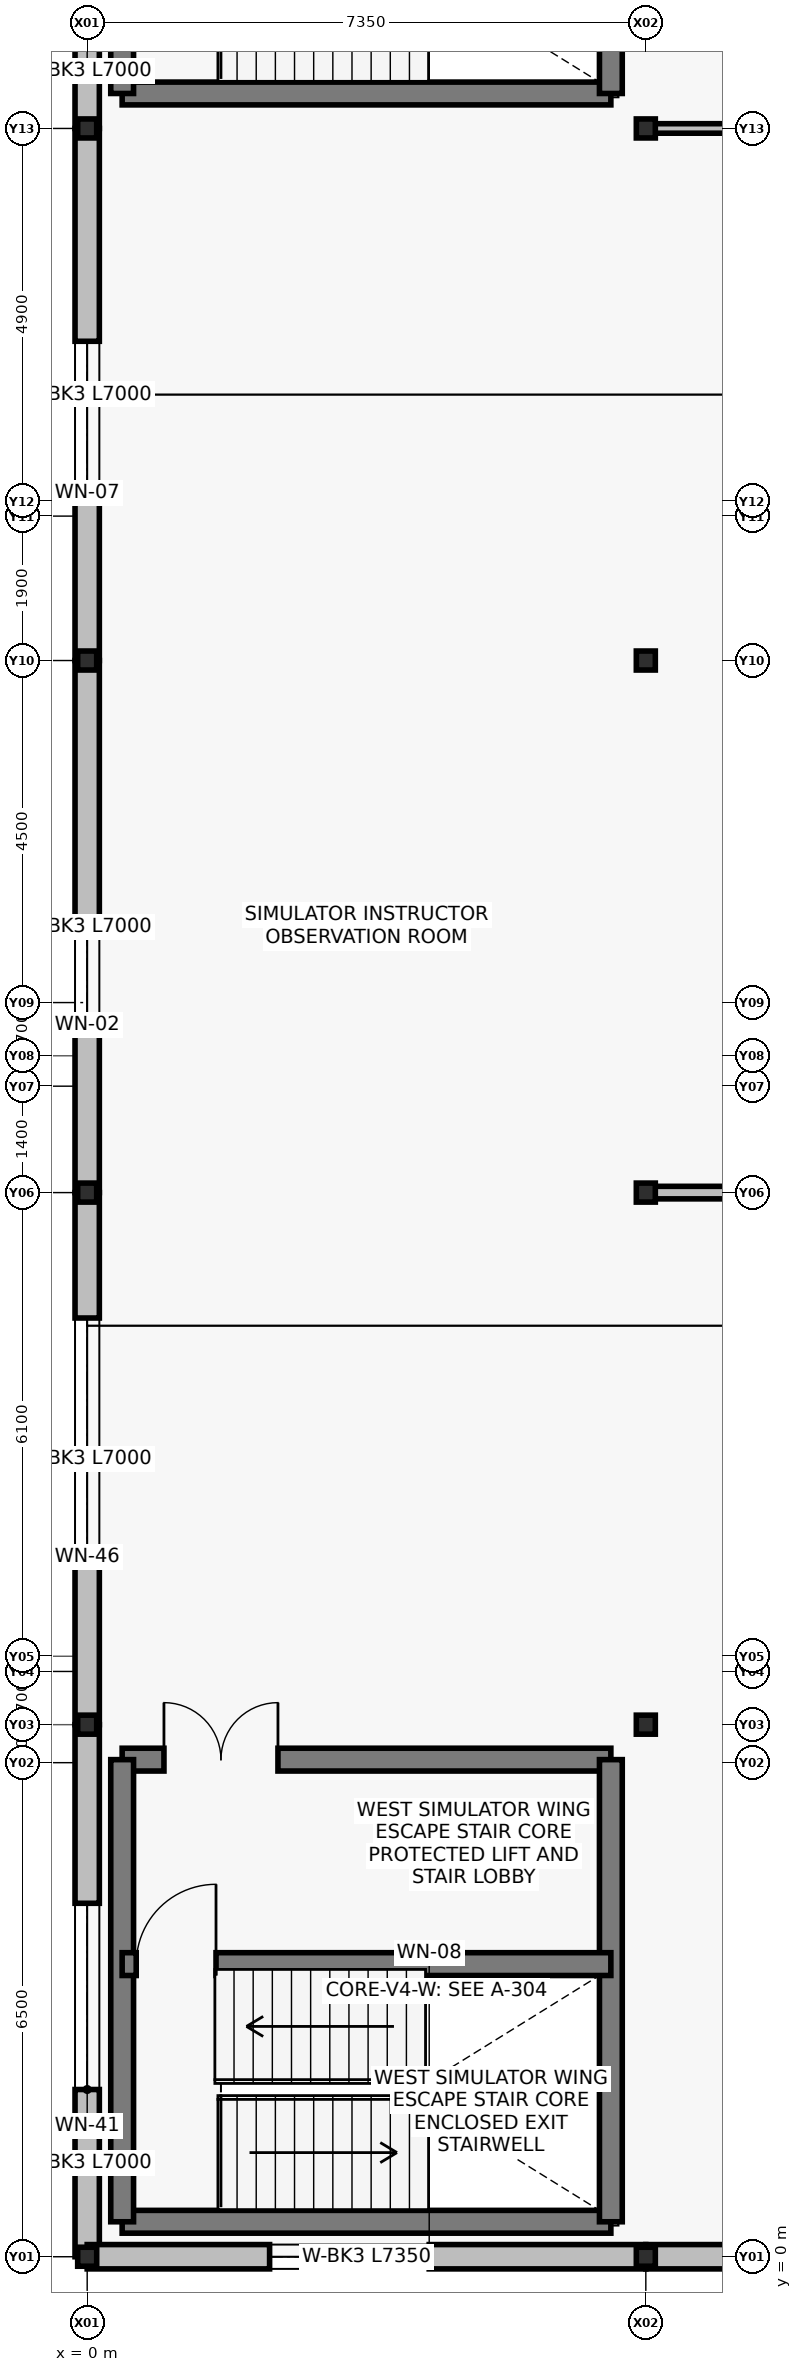
"""IFC4 building model, lengths in metres.
Left out: names, types, materials, properties, quantities, classifications, styles, units other than length and angle.
Written with IfcOpenShell. Run it as: python <this file> out.ifc"""

import sys

from ifc_helpers import new_model, si_unit, direction, frame, frame_2d, origin, origin_with_axes, origin_2d, place, context, subcontext, project, spatial, rectangle, i_section, extrude, element, fill, save


model = new_model("IFC4")
c1 = context("Model", 3, precision=1e-05, world=origin(), true_north=direction((0.0, 1.0)))
c2 = subcontext(c1, "Body", "Model", "MODEL_VIEW")
j1 = project(units=[si_unit("LENGTHUNIT", "METRE"), si_unit("PLANEANGLEUNIT", "RADIAN")], contexts=[c1])
p1 = place(None, origin())
s1 = spatial("IfcSite", under=j1, at=p1, CompositionType="ELEMENT")
p2 = place(p1, origin())
s2 = spatial("IfcBuilding", under=s1, at=p2, CompositionType="ELEMENT")
p3 = place(p2, frame((0.0, 0.0, 15.3)))
s3 = spatial("IfcBuildingStorey", under=s2, at=p3, CompositionType="ELEMENT", Elevation=15.3)
for number, where, z_axis, x_axis in (
    (1, (0.0, 0.0, 0.0), (0.0, 0.0, 1.0), (1.0, 0.0, 0.0)),
    (2, (0.0, 7.0, 0.0), (0.0, 0.0, 1.0), (1.0, 0.0, 0.0)),
    (3, (0.0, 14.0, 0.0), (0.0, 0.0, 1.0), (1.0, 0.0, 0.0)),
    (4, (0.0, 21.0, 0.0), (0.0, 0.0, 1.0), (1.0, 0.0, 0.0)),
    (5, (0.0, 28.0, 0.0), (0.0, 0.0, 1.0), (1.0, 0.0, 0.0)),
    (6, (7.35, 0.0, 0.0), (0.0, 0.0, 1.0), (1.0, 0.0, 0.0)),
    (7, (7.35, 7.0, 0.0), (0.0, 0.0, 1.0), (1.0, 0.0, 0.0)),
    (8, (7.35, 14.0, 0.0), (0.0, 0.0, 1.0), (1.0, 0.0, 0.0)),
    (9, (7.35, 21.0, 0.0), (0.0, 0.0, 1.0), (1.0, 0.0, 0.0)),
    (10, (7.35, 28.0, 0.0), (0.0, 0.0, 1.0), (1.0, 0.0, 0.0)),
):
    element("IfcColumn", number, at=place(p3, frame(where, z_axis=z_axis, x_axis=x_axis)), inside=s3, PredefinedType="COLUMN", context=c2, shape_type="SweptSolid", body=[
        extrude(i_section(OverallWidth=0.25, OverallDepth=0.25, WebThickness=0.009, FlangeThickness=0.014, at=origin_2d()), origin(), (0.0, 0.0, 1.0), 4.2),
    ])
p4 = place(p3, frame((0.0, 0.0, 0.0), z_axis=(0.0, 0.0, 1.0), x_axis=(0.0, 1.0, 0.0)))
e11 = element("IfcWall", 11, at=p4, inside=s3, PredefinedType="SOLIDWALL", context=c2, shape_type="SweptSolid", body=[
    extrude(rectangle(XDim=7.0, YDim=0.32, at=frame_2d((3.5, 0.0))), origin(), (0.0, 0.0, 1.0), 3.45),
])
p5 = place(p4, frame((2.2, 0.0, 0.9)))
e12 = element("IfcOpeningElement", 12, at=p5, cuts=e11, PredefinedType="OPENING", context=c2, shape_type="SweptSolid", body=[
    extrude(rectangle(XDim=2.45, YDim=2.05, at=frame_2d((1.225, 1.025))), frame((0.0, 0.17, 0.0), z_axis=(0.0, -1.0, 0.0), x_axis=(1.0, 0.0, 0.0)), (0.0, 0.0, 1.0), 0.34),
])
p6 = place(p3, frame((0.0, 7.0, 0.0), z_axis=(0.0, 0.0, 1.0), x_axis=(0.0, 1.0, 0.0)))
e13 = element("IfcWall", 13, at=p6, inside=s3, PredefinedType="SOLIDWALL", context=c2, shape_type="SweptSolid", body=[
    extrude(rectangle(XDim=7.0, YDim=0.32, at=frame_2d((3.5, 0.0))), origin(), (0.0, 0.0, 1.0), 3.45),
])
p7 = place(p6, frame((2.2, 0.0, 0.9)))
e14 = element("IfcOpeningElement", 14, at=p7, cuts=e13, PredefinedType="OPENING", context=c2, shape_type="SweptSolid", body=[
    extrude(rectangle(XDim=3.15, YDim=1.95, at=frame_2d((1.575, 0.975))), frame((0.0, 0.17, 0.0), z_axis=(0.0, -1.0, 0.0), x_axis=(1.0, 0.0, 0.0)), (0.0, 0.0, 1.0), 0.34),
])
p8 = place(p3, frame((0.0, 14.0, 0.0), z_axis=(0.0, 0.0, 1.0), x_axis=(0.0, 1.0, 0.0)))
e15 = element("IfcWall", 15, at=p8, inside=s3, PredefinedType="SOLIDWALL", context=c2, shape_type="SweptSolid", body=[
    extrude(rectangle(XDim=7.0, YDim=0.32, at=frame_2d((3.5, 0.0))), origin(), (0.0, 0.0, 1.0), 3.45),
])
p9 = place(p8, frame((2.2, 0.0, 0.9)))
e16 = element("IfcOpeningElement", 16, at=p9, cuts=e15, PredefinedType="OPENING", context=c2, shape_type="SweptSolid", body=[
    extrude(rectangle(XDim=1.4, YDim=1.6, at=frame_2d((0.7, 0.8))), frame((0.0, 0.17, 0.0), z_axis=(0.0, -1.0, 0.0), x_axis=(1.0, 0.0, 0.0)), (0.0, 0.0, 1.0), 0.34),
])
p10 = place(p3, frame((0.0, 21.0, 0.0), z_axis=(0.0, 0.0, 1.0), x_axis=(0.0, 1.0, 0.0)))
e17 = element("IfcWall", 17, at=p10, inside=s3, PredefinedType="SOLIDWALL", context=c2, shape_type="SweptSolid", body=[
    extrude(rectangle(XDim=7.0, YDim=0.32, at=frame_2d((3.5, 0.0))), origin(), (0.0, 0.0, 1.0), 3.45),
])
p11 = place(p10, frame((2.2, 0.0, 0.9)))
e18 = element("IfcOpeningElement", 18, at=p11, cuts=e17, PredefinedType="OPENING", context=c2, shape_type="SweptSolid", body=[
    extrude(rectangle(XDim=2.0, YDim=1.8, at=frame_2d((1.0, 0.9))), frame((0.0, 0.17, 0.0), z_axis=(0.0, -1.0, 0.0), x_axis=(1.0, 0.0, 0.0)), (0.0, 0.0, 1.0), 0.34),
])
p12 = place(p3, frame((0.0, 28.0, 0.0), z_axis=(0.0, 0.0, 1.0), x_axis=(0.0, 1.0, 0.0)))
e19 = element("IfcWall", 19, at=p12, inside=s3, PredefinedType="SOLIDWALL", context=c2, shape_type="SweptSolid", body=[
    extrude(rectangle(XDim=7.0, YDim=0.32, at=frame_2d((3.5, 0.0))), origin(), (0.0, 0.0, 1.0), 3.45),
])
p13 = place(p12, frame((2.2, 0.0, 0.9)))
e20 = element("IfcOpeningElement", 20, at=p13, cuts=e19, PredefinedType="OPENING", context=c2, shape_type="SweptSolid", body=[
    extrude(rectangle(XDim=2.8, YDim=2.1, at=frame_2d((1.4, 1.05))), frame((0.0, 0.17, 0.0), z_axis=(0.0, -1.0, 0.0), x_axis=(1.0, 0.0, 0.0)), (0.0, 0.0, 1.0), 0.34),
])
p14 = place(p3, origin_with_axes())
e21 = element("IfcWall", 21, at=p14, inside=s3, PredefinedType="SOLIDWALL", context=c2, shape_type="SweptSolid", body=[
    extrude(rectangle(XDim=7.35, YDim=0.32, at=frame_2d((3.675, 0.0))), origin(), (0.0, 0.0, 1.0), 3.45),
])
p15 = place(p14, frame((2.4, 0.0, 0.9)))
e22 = element("IfcOpeningElement", 22, at=p15, cuts=e21, PredefinedType="OPENING", context=c2, shape_type="SweptSolid", body=[
    extrude(rectangle(XDim=2.1, YDim=2.1, at=frame_2d((1.05, 1.05))), frame((0.0, 0.17, 0.0), z_axis=(0.0, -1.0, 0.0), x_axis=(1.0, 0.0, 0.0)), (0.0, 0.0, 1.0), 0.34),
])
p16 = place(p3, frame((7.35, 0.0, 0.0), z_axis=(0.0, 0.0, 1.0), x_axis=(1.0, 0.0, 0.0)))
e23 = element("IfcWall", 23, at=p16, inside=s3, PredefinedType="SOLIDWALL", context=c2, shape_type="SweptSolid", body=[
    extrude(rectangle(XDim=7.35, YDim=0.32, at=frame_2d((3.675, 0.0))), origin(), (0.0, 0.0, 1.0), 3.45),
])
p17 = place(p16, frame((2.4, 0.0, 0.9)))
e24 = element("IfcOpeningElement", 24, at=p17, cuts=e23, PredefinedType="OPENING", context=c2, shape_type="SweptSolid", body=[
    extrude(rectangle(XDim=2.4, YDim=1.8, at=frame_2d((1.2, 0.9))), frame((0.0, 0.17, 0.0), z_axis=(0.0, -1.0, 0.0), x_axis=(1.0, 0.0, 0.0)), (0.0, 0.0, 1.0), 0.34),
])
p18 = place(p3, frame((0.46, 28.46, 0.0), z_axis=(0.0, 0.0, 1.0), x_axis=(1.0, 0.0, 0.0)))
e25 = element("IfcWall", 25, at=p18, inside=s3, PredefinedType="SHEAR", context=c2, shape_type="SweptSolid", body=[
    extrude(rectangle(XDim=6.43, YDim=0.3, at=frame_2d((3.215, 0.0))), origin(), (0.0, 0.0, 1.0), 3.92),
])
for number, where, z_axis, x_axis in (
    (26, (0.46, 28.46, 0.0), (0.0, 0.0, 1.0), (0.0, 1.0, 0.0)),
    (27, (6.89, 28.46, 0.0), (0.0, 0.0, 1.0), (0.0, 1.0, 0.0)),
):
    element("IfcWall", number, at=place(p3, frame(where, z_axis=z_axis, x_axis=x_axis)), inside=s3, PredefinedType="SHEAR", context=c2, shape_type="SweptSolid", body=[
        extrude(rectangle(XDim=6.08, YDim=0.3, at=frame_2d((3.04, 0.0))), origin(), (0.0, 0.0, 1.0), 3.92),
    ])
p19 = place(p3, frame((0.46, 0.46, 0.0), z_axis=(0.0, 0.0, 1.0), x_axis=(1.0, 0.0, 0.0)))
e28 = element("IfcWall", 28, at=p19, inside=s3, PredefinedType="SHEAR", context=c2, shape_type="SweptSolid", body=[
    extrude(rectangle(XDim=6.43, YDim=0.3, at=frame_2d((3.215, 0.0))), origin(), (0.0, 0.0, 1.0), 3.92),
])
p20 = place(p3, frame((0.46, 6.54, 0.0), z_axis=(0.0, 0.0, 1.0), x_axis=(1.0, 0.0, 0.0)))
e29 = element("IfcWall", 29, at=p20, inside=s3, PredefinedType="SHEAR", context=c2, shape_type="SweptSolid", body=[
    extrude(rectangle(XDim=6.43, YDim=0.3, at=frame_2d((3.215, 0.0))), origin(), (0.0, 0.0, 1.0), 3.92),
])
p21 = place(p20, frame((0.55, 0.0, 0.0)))
e30 = element("IfcOpeningElement", 30, at=p21, cuts=e29, PredefinedType="OPENING", context=c2, shape_type="SweptSolid", body=[
    extrude(rectangle(XDim=1.5, YDim=2.2, at=frame_2d((0.75, 1.1))), frame((0.0, 0.16, 0.0), z_axis=(0.0, -1.0, 0.0), x_axis=(1.0, 0.0, 0.0)), (0.0, 0.0, 1.0), 0.32),
])
for number, where, z_axis, x_axis in (
    (31, (0.46, 0.46, 0.0), (0.0, 0.0, 1.0), (0.0, 1.0, 0.0)),
    (32, (6.89, 0.46, 0.0), (0.0, 0.0, 1.0), (0.0, 1.0, 0.0)),
):
    element("IfcWall", number, at=place(p3, frame(where, z_axis=z_axis, x_axis=x_axis)), inside=s3, PredefinedType="SHEAR", context=c2, shape_type="SweptSolid", body=[
        extrude(rectangle(XDim=6.08, YDim=0.3, at=frame_2d((3.04, 0.0))), origin(), (0.0, 0.0, 1.0), 3.92),
    ])
p22 = place(p3, frame((0.46, 3.85, 0.0), z_axis=(0.0, 0.0, 1.0), x_axis=(1.0, 0.0, 0.0)))
e33 = element("IfcWall", 33, at=p22, inside=s3, PredefinedType="SHEAR", context=c2, shape_type="SweptSolid", body=[
    extrude(rectangle(XDim=6.43, YDim=0.3, at=frame_2d((3.215, 0.0))), origin(), (0.0, 0.0, 1.0), 3.92),
])
p23 = place(p22, frame((0.185, 0.0, 0.0)))
e34 = element("IfcOpeningElement", 34, at=p23, cuts=e33, PredefinedType="OPENING", context=c2, shape_type="SweptSolid", body=[
    extrude(rectangle(XDim=1.05, YDim=2.15, at=frame_2d((0.525, 1.075))), frame((0.0, 0.16, 0.0), z_axis=(0.0, -1.0, 0.0), x_axis=(1.0, 0.0, 0.0)), (0.0, 0.0, 1.0), 0.32),
])
p24 = place(p3, frame((7.35, 14.0, 0.0), z_axis=(0.0, 0.0, 1.0), x_axis=(1.0, 0.0, 0.0)))
e35 = element("IfcWall", 35, at=p24, inside=s3, PredefinedType="PARTITIONING", context=c2, shape_type="SweptSolid", body=[
    extrude(rectangle(XDim=22.05, YDim=0.165, at=frame_2d((11.025, 0.0))), origin(), (0.0, 0.0, 1.0), 3.2),
])
p25 = place(p24, frame((4.0, 0.0, 0.0)))
e36 = element("IfcOpeningElement", 36, at=p25, cuts=e35, PredefinedType="OPENING", context=c2, shape_type="SweptSolid", body=[
    extrude(rectangle(XDim=1.7, YDim=2.25, at=frame_2d((0.85, 1.125))), frame((0.0, 0.092, 0.0), z_axis=(0.0, -1.0, 0.0), x_axis=(1.0, 0.0, 0.0)), (0.0, 0.0, 1.0), 0.185),
])
p26 = place(p3, frame((7.35, 28.0, 0.0), z_axis=(0.0, 0.0, 1.0), x_axis=(1.0, 0.0, 0.0)))
e37 = element("IfcWall", 37, at=p26, inside=s3, PredefinedType="PARTITIONING", context=c2, shape_type="SweptSolid", body=[
    extrude(rectangle(XDim=14.7, YDim=0.125, at=frame_2d((7.35, 0.0))), origin(), (0.0, 0.0, 1.0), 3.2),
])
p27 = place(p26, frame((4.0, 0.0, 0.0)))
e38 = element("IfcOpeningElement", 38, at=p27, cuts=e37, PredefinedType="OPENING", context=c2, shape_type="SweptSolid", body=[
    extrude(rectangle(XDim=1.35, YDim=2.2, at=frame_2d((0.675, 1.1))), frame((0.0, 0.072, 0.0), z_axis=(0.0, -1.0, 0.0), x_axis=(1.0, 0.0, 0.0)), (0.0, 0.0, 1.0), 0.145),
])
p28 = place(p5, origin())
e39 = element("IfcWindow", 39, at=p28, inside=s3, PartitioningType="SINGLE_PANEL", PredefinedType="WINDOW", context=c2, shape_type="SweptSolid", body=[
    extrude(rectangle(XDim=2.45, YDim=2.05, at=frame_2d((1.225, 1.025))), frame((0.0, 0.03, 0.0), z_axis=(0.0, -1.0, 0.0), x_axis=(1.0, 0.0, 0.0)), (0.0, 0.0, 1.0), 0.06),
])
fill(e12, e39)
p29 = place(p7, origin())
e40 = element("IfcWindow", 40, at=p29, inside=s3, PartitioningType="SINGLE_PANEL", PredefinedType="WINDOW", context=c2, shape_type="SweptSolid", body=[
    extrude(rectangle(XDim=3.15, YDim=1.95, at=frame_2d((1.575, 0.975))), frame((0.0, 0.03, 0.0), z_axis=(0.0, -1.0, 0.0), x_axis=(1.0, 0.0, 0.0)), (0.0, 0.0, 1.0), 0.06),
])
fill(e14, e40)
p30 = place(p9, origin())
e41 = element("IfcWindow", 41, at=p30, inside=s3, PartitioningType="SINGLE_PANEL", PredefinedType="WINDOW", context=c2, shape_type="SweptSolid", body=[
    extrude(rectangle(XDim=1.4, YDim=1.6, at=frame_2d((0.7, 0.8))), frame((0.0, 0.03, 0.0), z_axis=(0.0, -1.0, 0.0), x_axis=(1.0, 0.0, 0.0)), (0.0, 0.0, 1.0), 0.06),
])
fill(e16, e41)
p31 = place(p11, origin())
e42 = element("IfcWindow", 42, at=p31, inside=s3, PartitioningType="SINGLE_PANEL", PredefinedType="WINDOW", context=c2, shape_type="SweptSolid", body=[
    extrude(rectangle(XDim=2.0, YDim=1.8, at=frame_2d((1.0, 0.9))), frame((0.0, 0.03, 0.0), z_axis=(0.0, -1.0, 0.0), x_axis=(1.0, 0.0, 0.0)), (0.0, 0.0, 1.0), 0.06),
])
fill(e18, e42)
p32 = place(p15, origin())
e43 = element("IfcWindow", 43, at=p32, inside=s3, PartitioningType="SINGLE_PANEL", PredefinedType="WINDOW", context=c2, shape_type="SweptSolid", body=[
    extrude(rectangle(XDim=2.1, YDim=2.1, at=frame_2d((1.05, 1.05))), frame((0.0, 0.03, 0.0), z_axis=(0.0, -1.0, 0.0), x_axis=(1.0, 0.0, 0.0)), (0.0, 0.0, 1.0), 0.06),
])
fill(e22, e43)
p33 = place(p23, origin())
e44 = element("IfcDoor", 44, at=p33, inside=s3, OperationType="SINGLE_SWING_RIGHT", PredefinedType="DOOR", context=c2, shape_type="SweptSolid", body=[
    extrude(rectangle(XDim=1.05, YDim=2.15, at=frame_2d((0.525, 1.075))), frame((0.0, 0.025, 0.0), z_axis=(0.0, -1.0, 0.0), x_axis=(1.0, 0.0, 0.0)), (0.0, 0.0, 1.0), 0.05),
])
fill(e34, e44)
p34 = place(p21, origin())
e45 = element("IfcDoor", 45, at=p34, inside=s3, OperationType="DOUBLE_DOOR_SINGLE_SWING", PredefinedType="DOOR", context=c2, shape_type="SweptSolid", body=[
    extrude(rectangle(XDim=1.5, YDim=2.2, at=frame_2d((0.75, 1.1))), frame((0.0, 0.025, 0.0), z_axis=(0.0, -1.0, 0.0), x_axis=(1.0, 0.0, 0.0)), (0.0, 0.0, 1.0), 0.05),
])
fill(e30, e45)
save(model, sys.argv[1])
